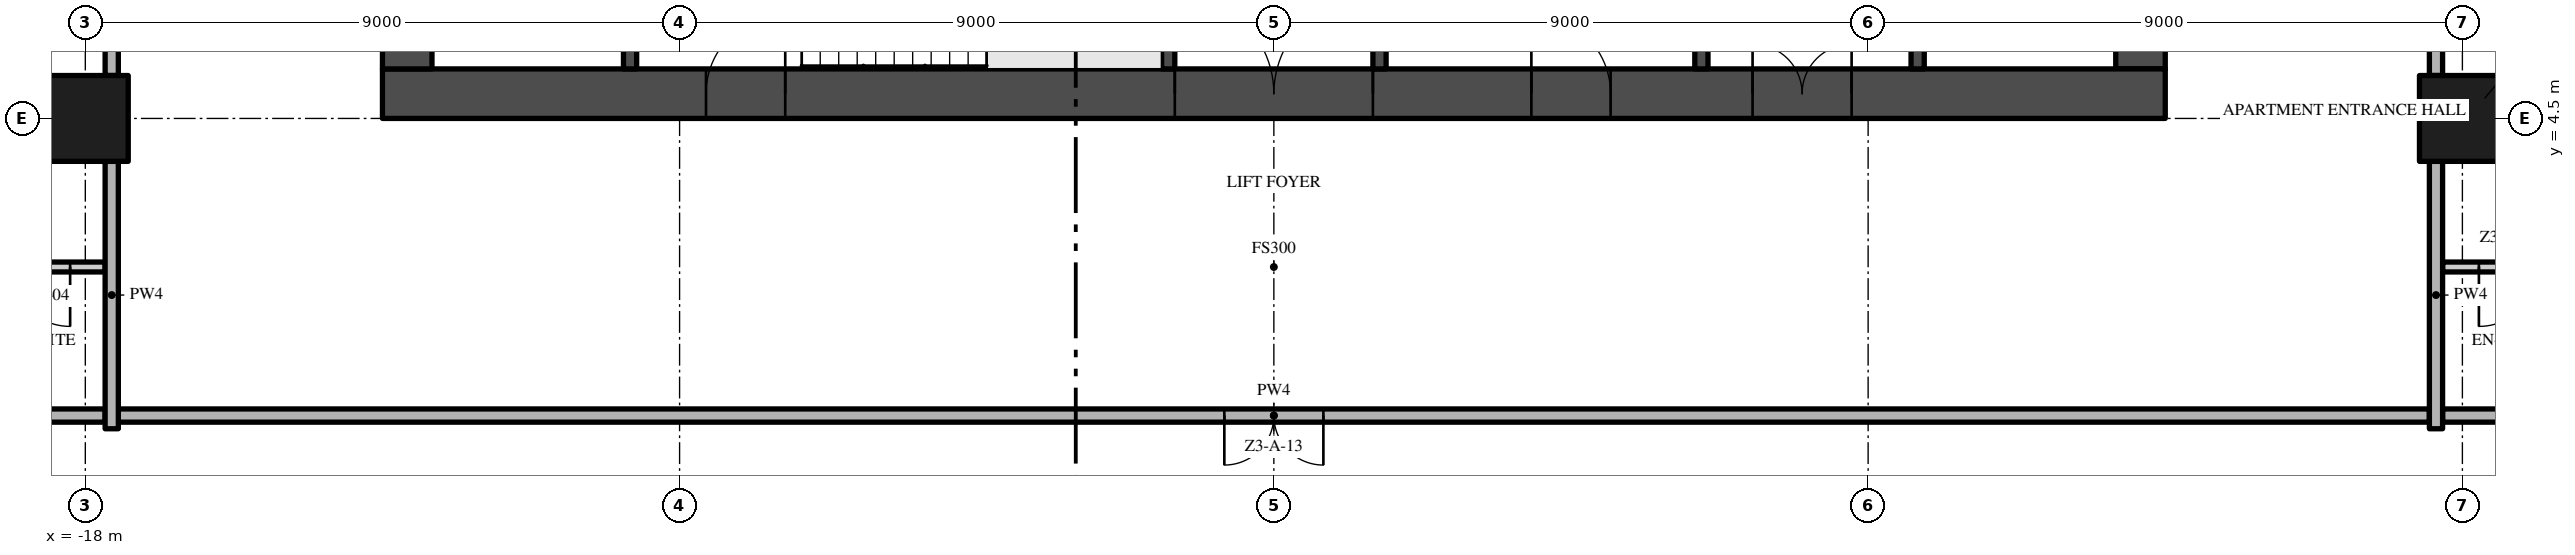
"""IFC4 building model, lengths in metres.
Left out: names, types, materials, properties, quantities, classifications, styles, units other than length and angle.
Written with IfcOpenShell. Run it as: python <this file> out.ifc"""

import sys

from ifc_helpers import new_model, si_unit, direction, frame, frame_2d, origin, origin_2d, place, context, subcontext, project, spatial, rectangle, extrude, element, fill, save


model = new_model("IFC4")
c1 = context("Model", 3, precision=1e-05, world=origin(), true_north=direction((0.0, 1.0)))
c2 = subcontext(c1, "Body", "Model", "MODEL_VIEW")
j1 = project(units=[si_unit("LENGTHUNIT", "METRE"), si_unit("PLANEANGLEUNIT", "RADIAN")], contexts=[c1])
p1 = place(None, origin())
s1 = spatial("IfcSite", under=j1, at=p1, CompositionType="ELEMENT")
p2 = place(p1, origin())
s2 = spatial("IfcBuilding", under=s1, at=p2, CompositionType="ELEMENT")
p3 = place(p2, frame((0.0, 0.0, 125.0)))
s3 = spatial("IfcBuildingStorey", under=s2, at=p3, CompositionType="ELEMENT", Elevation=125.0)
p4 = place(p3, frame((-13.5, 4.875, -0.3), z_axis=(0.0, 0.0, 1.0), x_axis=(1.0, 0.0, 0.0)))
e1 = element("IfcWall", 1, at=p4, inside=s3, PredefinedType="SHEAR", context=c2, shape_type="SweptSolid", body=[
    extrude(rectangle(XDim=27.0, YDim=0.75, at=frame_2d((13.5, 0.0))), origin(), (0.0, 0.0, 1.0), 3.8),
])
p5 = place(p4, frame((12.0, 0.0, 0.3)))
e2 = element("IfcOpeningElement", 2, at=p5, cuts=e1, PredefinedType="OPENING", context=c2, shape_type="SweptSolid", body=[
    extrude(rectangle(XDim=3.0, YDim=2.4, at=frame_2d((1.5, 1.2))), frame((0.0, 0.385, 0.0), z_axis=(0.0, -1.0, 0.0), x_axis=(1.0, 0.0, 0.0)), (0.0, 0.0, 1.0), 0.77),
])
p6 = place(p4, frame((4.9, 0.0, 0.3)))
e3 = element("IfcOpeningElement", 3, at=p6, cuts=e1, PredefinedType="OPENING", context=c2, shape_type="SweptSolid", body=[
    extrude(rectangle(XDim=1.2, YDim=2.2, at=frame_2d((0.6, 1.1))), frame((0.0, 0.385, 0.0), z_axis=(0.0, -1.0, 0.0), x_axis=(1.0, 0.0, 0.0)), (0.0, 0.0, 1.0), 0.77),
])
p7 = place(p4, frame((20.75, 0.0, 0.3)))
e4 = element("IfcOpeningElement", 4, at=p7, cuts=e1, PredefinedType="OPENING", context=c2, shape_type="SweptSolid", body=[
    extrude(rectangle(XDim=1.5, YDim=2.2, at=frame_2d((0.75, 1.1))), frame((0.0, 0.385, 0.0), z_axis=(0.0, -1.0, 0.0), x_axis=(1.0, 0.0, 0.0)), (0.0, 0.0, 1.0), 0.77),
])
p8 = place(p4, frame((17.4, 0.0, 0.3)))
e5 = element("IfcOpeningElement", 5, at=p8, cuts=e1, PredefinedType="OPENING", context=c2, shape_type="SweptSolid", body=[
    extrude(rectangle(XDim=1.2, YDim=2.2, at=frame_2d((0.6, 1.1))), frame((0.0, 0.385, 0.0), z_axis=(0.0, -1.0, 0.0), x_axis=(1.0, 0.0, 0.0)), (0.0, 0.0, 1.0), 0.77),
])
p9 = place(p3, frame((13.125, 5.25, -0.3), z_axis=(0.0, 0.0, 1.0), x_axis=(0.0, 1.0, 0.0)))
e6 = element("IfcWall", 6, at=p9, inside=s3, PredefinedType="SHEAR", context=c2, shape_type="SweptSolid", body=[
    extrude(rectangle(XDim=16.5, YDim=0.75, at=frame_2d((8.25, 0.0))), origin(), (0.0, 0.0, 1.0), 3.8),
])
p10 = place(p9, frame((6.15, 0.0, 0.3)))
e7 = element("IfcOpeningElement", 7, at=p10, cuts=e6, PredefinedType="OPENING", context=c2, shape_type="SweptSolid", body=[
    extrude(rectangle(XDim=1.2, YDim=2.2, at=frame_2d((0.6, 1.1))), frame((0.0, 0.385, 0.0), z_axis=(0.0, -1.0, 0.0), x_axis=(1.0, 0.0, 0.0)), (0.0, 0.0, 1.0), 0.77),
])
p11 = place(p3, frame((-13.125, 21.75, -0.3), z_axis=(0.0, 0.0, 1.0), x_axis=(0.0, -1.0, 0.0)))
e8 = element("IfcWall", 8, at=p11, inside=s3, PredefinedType="SHEAR", context=c2, shape_type="SweptSolid", body=[
    extrude(rectangle(XDim=16.5, YDim=0.75, at=frame_2d((8.25, 0.0))), origin(), (0.0, 0.0, 1.0), 3.8),
])
p12 = place(p11, frame((9.15, 0.0, 0.3)))
e9 = element("IfcOpeningElement", 9, at=p12, cuts=e8, PredefinedType="OPENING", context=c2, shape_type="SweptSolid", body=[
    extrude(rectangle(XDim=1.2, YDim=2.2, at=frame_2d((0.6, 1.1))), frame((0.0, 0.385, 0.0), z_axis=(0.0, -1.0, 0.0), x_axis=(1.0, 0.0, 0.0)), (0.0, 0.0, 1.0), 0.77),
])
for number, where, z_axis, x_axis in (
    (10, (-18.0, 4.5, 0.0), (0.0, 0.0, 1.0), (1.0, 0.0, 0.0)),
    (11, (18.0, 4.5, 0.0), (0.0, 0.0, 1.0), (1.0, 0.0, 0.0)),
):
    element("IfcColumn", number, at=place(p3, frame(where, z_axis=z_axis, x_axis=x_axis)), inside=s3, PredefinedType="COLUMN", context=c2, shape_type="SweptSolid", body=[
        extrude(rectangle(XDim=1.3, YDim=1.3, at=origin_2d()), origin(), (0.0, 0.0, 1.0), 3.5),
    ])
for number, where, z_axis, x_axis in (
    (12, (-9.75, 5.25, 0.0), (0.0, 0.0, 1.0), (0.0, 1.0, 0.0)),
    (13, (-1.6, 5.25, 0.0), (0.0, 0.0, 1.0), (0.0, 1.0, 0.0)),
):
    element("IfcWall", number, at=place(p3, frame(where, z_axis=z_axis, x_axis=x_axis)), inside=s3, PredefinedType="SHEAR", context=c2, shape_type="SweptSolid", body=[
        extrude(rectangle(XDim=2.7, YDim=0.2, at=frame_2d((1.35, 0.0))), origin(), (0.0, 0.0, 1.0), 3.5),
    ])
p13 = place(p3, frame((1.6, 11.5, 0.0), z_axis=(0.0, 0.0, 1.0), x_axis=(0.0, -1.0, 0.0)))
e14 = element("IfcWall", 14, at=p13, inside=s3, PredefinedType="SHEAR", context=c2, shape_type="SweptSolid", body=[
    extrude(rectangle(XDim=6.25, YDim=0.2, at=frame_2d((3.125, 0.0))), origin(), (0.0, 0.0, 1.0), 3.5),
])
p14 = place(p13, frame((2.275, 0.0, 0.0)))
e15 = element("IfcOpeningElement", 15, at=p14, cuts=e14, PredefinedType="OPENING", context=c2, shape_type="SweptSolid", body=[
    extrude(rectangle(XDim=0.9, YDim=2.1, at=frame_2d((0.45, 1.05))), frame((0.0, 0.11, 0.0), z_axis=(0.0, -1.0, 0.0), x_axis=(1.0, 0.0, 0.0)), (0.0, 0.0, 1.0), 0.22),
])
p15 = place(p3, frame((6.475, 5.25, 0.0), z_axis=(0.0, 0.0, 1.0), x_axis=(0.0, 1.0, 0.0)))
e16 = element("IfcWall", 16, at=p15, inside=s3, PredefinedType="SHEAR", context=c2, shape_type="SweptSolid", body=[
    extrude(rectangle(XDim=6.25, YDim=0.2, at=frame_2d((3.125, 0.0))), origin(), (0.0, 0.0, 1.0), 3.5),
])
p16 = place(p3, frame((9.75, 5.25, 0.0), z_axis=(0.0, 0.0, 1.0), x_axis=(0.0, 1.0, 0.0)))
e17 = element("IfcWall", 17, at=p16, inside=s3, PredefinedType="SHEAR", context=c2, shape_type="SweptSolid", body=[
    extrude(rectangle(XDim=2.35, YDim=0.2, at=frame_2d((1.175, 0.0))), origin(), (0.0, 0.0, 1.0), 3.5),
])
p17 = place(p16, frame((0.7, 0.0, 0.0)))
e18 = element("IfcOpeningElement", 18, at=p17, cuts=e17, PredefinedType="OPENING", context=c2, shape_type="SweptSolid", body=[
    extrude(rectangle(XDim=1.1, YDim=2.1, at=frame_2d((0.55, 1.05))), frame((0.0, 0.11, 0.0), z_axis=(0.0, -1.0, 0.0), x_axis=(1.0, 0.0, 0.0)), (0.0, 0.0, 1.0), 0.22),
])
p18 = place(p3, frame((17.5, 0.0, 0.0), z_axis=(0.0, 0.0, 1.0), x_axis=(-1.0, 0.0, 0.0)))
e19 = element("IfcWall", 19, at=p18, inside=s3, PredefinedType="PARTITIONING", context=c2, shape_type="SweptSolid", body=[
    extrude(rectangle(XDim=35.0, YDim=0.2, at=frame_2d((17.5, 0.0))), origin(), (0.0, 0.0, 1.0), 3.5),
])
p19 = place(p18, frame((16.75, 0.0, 0.0)))
e20 = element("IfcOpeningElement", 20, at=p19, cuts=e19, PredefinedType="OPENING", context=c2, shape_type="SweptSolid", body=[
    extrude(rectangle(XDim=1.5, YDim=2.4, at=frame_2d((0.75, 1.2))), frame((0.0, 0.11, 0.0), z_axis=(0.0, -1.0, 0.0), x_axis=(1.0, 0.0, 0.0)), (0.0, 0.0, 1.0), 0.22),
])
for number, where, z_axis, x_axis in (
    (21, (-22.2, 0.0, 0.0), (0.0, 0.0, 1.0), (1.0, 0.0, 0.0)),
    (22, (17.7, 0.0, 0.0), (0.0, 0.0, 1.0), (1.0, 0.0, 0.0)),
):
    element("IfcWall", number, at=place(p3, frame(where, z_axis=z_axis, x_axis=x_axis)), inside=s3, PredefinedType="PARTITIONING", context=c2, shape_type="SweptSolid", body=[
        extrude(rectangle(XDim=4.5, YDim=0.2, at=frame_2d((2.25, 0.0))), origin(), (0.0, 0.0, 1.0), 3.5),
    ])
p20 = place(p3, frame((-17.7, 2.25, 0.0), z_axis=(0.0, 0.0, 1.0), x_axis=(-1.0, 0.0, 0.0)))
e23 = element("IfcWall", 23, at=p20, inside=s3, PredefinedType="PARTITIONING", context=c2, shape_type="SweptSolid", body=[
    extrude(rectangle(XDim=2.03, YDim=0.15, at=frame_2d((1.015, 0.0))), origin(), (0.0, 0.0, 1.0), 3.5),
])
p21 = place(p20, frame((0.53, 0.0, 0.0)))
e24 = element("IfcOpeningElement", 24, at=p21, cuts=e23, PredefinedType="OPENING", context=c2, shape_type="SweptSolid", body=[
    extrude(rectangle(XDim=0.9, YDim=2.1, at=frame_2d((0.45, 1.05))), frame((0.0, 0.085, 0.0), z_axis=(0.0, -1.0, 0.0), x_axis=(1.0, 0.0, 0.0)), (0.0, 0.0, 1.0), 0.17),
])
p22 = place(p3, frame((19.73, 2.25, 0.0), z_axis=(0.0, 0.0, 1.0), x_axis=(-1.0, 0.0, 0.0)))
e25 = element("IfcWall", 25, at=p22, inside=s3, PredefinedType="PARTITIONING", context=c2, shape_type="SweptSolid", body=[
    extrude(rectangle(XDim=2.03, YDim=0.15, at=frame_2d((1.015, 0.0))), origin(), (0.0, 0.0, 1.0), 3.5),
])
p23 = place(p22, frame((0.58, 0.0, 0.0)))
e26 = element("IfcOpeningElement", 26, at=p23, cuts=e25, PredefinedType="OPENING", context=c2, shape_type="SweptSolid", body=[
    extrude(rectangle(XDim=0.9, YDim=2.1, at=frame_2d((0.45, 1.05))), frame((0.0, 0.085, 0.0), z_axis=(0.0, -1.0, 0.0), x_axis=(1.0, 0.0, 0.0)), (0.0, 0.0, 1.0), 0.17),
])
p24 = place(p3, frame((-17.6, -0.2, 0.0), z_axis=(0.0, 0.0, 1.0), x_axis=(0.0, 1.0, 0.0)))
e27 = element("IfcWall", 27, at=p24, inside=s3, PredefinedType="PARTITIONING", context=c2, shape_type="SweptSolid", body=[
    extrude(rectangle(XDim=4.05, YDim=0.2, at=frame_2d((2.025, 0.0))), origin(), (0.0, 0.0, 1.0), 3.5),
])
p25 = place(p3, frame((-17.6, 5.15, 0.0), z_axis=(0.0, 0.0, 1.0), x_axis=(0.0, 1.0, 0.0)))
e28 = element("IfcWall", 28, at=p25, inside=s3, PredefinedType="PARTITIONING", context=c2, shape_type="SweptSolid", body=[
    extrude(rectangle(XDim=7.7, YDim=0.2, at=frame_2d((3.85, 0.0))), origin(), (0.0, 0.0, 1.0), 3.5),
])
p26 = place(p25, frame((1.0, 0.0, 0.0)))
e29 = element("IfcOpeningElement", 29, at=p26, cuts=e28, PredefinedType="OPENING", context=c2, shape_type="SweptSolid", body=[
    extrude(rectangle(XDim=1.2, YDim=2.4, at=frame_2d((0.6, 1.2))), frame((0.0, 0.11, 0.0), z_axis=(0.0, -1.0, 0.0), x_axis=(1.0, 0.0, 0.0)), (0.0, 0.0, 1.0), 0.22),
])
p27 = place(p3, frame((17.6, -0.2, 0.0), z_axis=(0.0, 0.0, 1.0), x_axis=(0.0, 1.0, 0.0)))
e30 = element("IfcWall", 30, at=p27, inside=s3, PredefinedType="PARTITIONING", context=c2, shape_type="SweptSolid", body=[
    extrude(rectangle(XDim=4.05, YDim=0.2, at=frame_2d((2.025, 0.0))), origin(), (0.0, 0.0, 1.0), 3.5),
])
p28 = place(p3, frame((17.6, 12.85, 0.0), z_axis=(0.0, 0.0, 1.0), x_axis=(0.0, -1.0, 0.0)))
e31 = element("IfcWall", 31, at=p28, inside=s3, PredefinedType="PARTITIONING", context=c2, shape_type="SweptSolid", body=[
    extrude(rectangle(XDim=7.7, YDim=0.2, at=frame_2d((3.85, 0.0))), origin(), (0.0, 0.0, 1.0), 3.5),
])
p29 = place(p28, frame((5.5, 0.0, 0.0)))
e32 = element("IfcOpeningElement", 32, at=p29, cuts=e31, PredefinedType="OPENING", context=c2, shape_type="SweptSolid", body=[
    extrude(rectangle(XDim=1.2, YDim=2.4, at=frame_2d((0.6, 1.2))), frame((0.0, 0.11, 0.0), z_axis=(0.0, -1.0, 0.0), x_axis=(1.0, 0.0, 0.0)), (0.0, 0.0, 1.0), 0.22),
])
p30 = place(p5, frame((3.0, 0.0, 0.0), z_axis=(0.0, 0.0, 1.0), x_axis=(-1.0, 0.0, 0.0)))
e33 = element("IfcDoor", 33, at=p30, inside=s3, OperationType="DOUBLE_DOOR_SINGLE_SWING", PredefinedType="DOOR", context=c2, shape_type="SweptSolid", body=[
    extrude(rectangle(XDim=3.0, YDim=2.4, at=frame_2d((1.5, 1.2))), frame((0.0, 0.025, 0.0), z_axis=(0.0, -1.0, 0.0), x_axis=(1.0, 0.0, 0.0)), (0.0, 0.0, 1.0), 0.05),
])
fill(e2, e33)
p31 = place(p6, frame((1.2, 0.0, 0.0), z_axis=(0.0, 0.0, 1.0), x_axis=(-1.0, 0.0, 0.0)))
e34 = element("IfcDoor", 34, at=p31, inside=s3, OperationType="SINGLE_SWING_LEFT", PredefinedType="DOOR", context=c2, shape_type="SweptSolid", body=[
    extrude(rectangle(XDim=1.2, YDim=2.2, at=frame_2d((0.6, 1.1))), frame((0.0, 0.025, 0.0), z_axis=(0.0, -1.0, 0.0), x_axis=(1.0, 0.0, 0.0)), (0.0, 0.0, 1.0), 0.05),
])
fill(e3, e34)
p32 = place(p7, frame((1.5, 0.0, 0.0), z_axis=(0.0, 0.0, 1.0), x_axis=(-1.0, 0.0, 0.0)))
e35 = element("IfcDoor", 35, at=p32, inside=s3, OperationType="DOUBLE_DOOR_SINGLE_SWING", PredefinedType="DOOR", context=c2, shape_type="SweptSolid", body=[
    extrude(rectangle(XDim=1.5, YDim=2.2, at=frame_2d((0.75, 1.1))), frame((0.0, 0.025, 0.0), z_axis=(0.0, -1.0, 0.0), x_axis=(1.0, 0.0, 0.0)), (0.0, 0.0, 1.0), 0.05),
])
fill(e4, e35)
p33 = place(p8, frame((1.2, 0.0, 0.0), z_axis=(0.0, 0.0, 1.0), x_axis=(-1.0, 0.0, 0.0)))
e36 = element("IfcDoor", 36, at=p33, inside=s3, OperationType="SINGLE_SWING_RIGHT", PredefinedType="DOOR", context=c2, shape_type="SweptSolid", body=[
    extrude(rectangle(XDim=1.2, YDim=2.2, at=frame_2d((0.6, 1.1))), frame((0.0, 0.025, 0.0), z_axis=(0.0, -1.0, 0.0), x_axis=(1.0, 0.0, 0.0)), (0.0, 0.0, 1.0), 0.05),
])
fill(e5, e36)
p34 = place(p21, origin())
e37 = element("IfcDoor", 37, at=p34, inside=s3, OperationType="SINGLE_SWING_LEFT", PredefinedType="DOOR", context=c2, shape_type="SweptSolid", body=[
    extrude(rectangle(XDim=0.9, YDim=2.1, at=frame_2d((0.45, 1.05))), frame((0.0, 0.025, 0.0), z_axis=(0.0, -1.0, 0.0), x_axis=(1.0, 0.0, 0.0)), (0.0, 0.0, 1.0), 0.05),
])
fill(e24, e37)
p35 = place(p23, origin())
e38 = element("IfcDoor", 38, at=p35, inside=s3, OperationType="SINGLE_SWING_RIGHT", PredefinedType="DOOR", context=c2, shape_type="SweptSolid", body=[
    extrude(rectangle(XDim=0.9, YDim=2.1, at=frame_2d((0.45, 1.05))), frame((0.0, 0.025, 0.0), z_axis=(0.0, -1.0, 0.0), x_axis=(1.0, 0.0, 0.0)), (0.0, 0.0, 1.0), 0.05),
])
fill(e26, e38)
p36 = place(p19, origin())
e39 = element("IfcDoor", 39, at=p36, inside=s3, OperationType="DOUBLE_DOOR_SINGLE_SWING", PredefinedType="DOOR", context=c2, shape_type="SweptSolid", body=[
    extrude(rectangle(XDim=1.5, YDim=2.4, at=frame_2d((0.75, 1.2))), frame((0.0, 0.025, 0.0), z_axis=(0.0, -1.0, 0.0), x_axis=(1.0, 0.0, 0.0)), (0.0, 0.0, 1.0), 0.05),
])
fill(e20, e39)
save(model, sys.argv[1])
